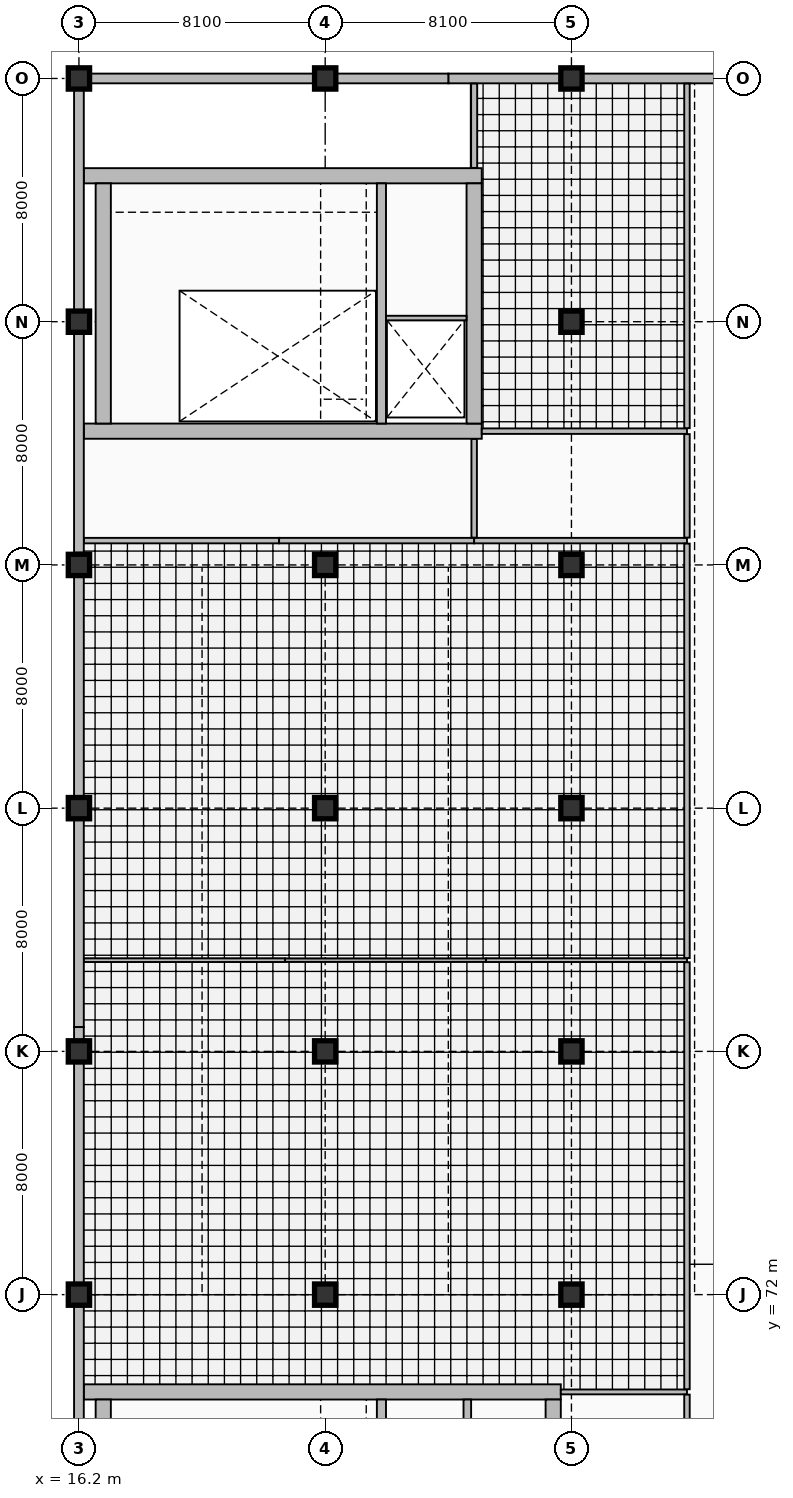
"""IFC4 building model, lengths in metres.
Left out: names, types, materials, properties, quantities, classifications, styles, units other than length and angle.
Written with IfcOpenShell. Run it as: python <this file> out.ifc"""

import sys

from ifc_helpers import new_model, si_unit, direction, frame, frame_2d, origin, origin_2d, place, context, subcontext, project, spatial, rectangle, extrude, element, fill, save


model = new_model("IFC4")
c1 = context("Model", 3, precision=1e-05, world=origin(), true_north=direction((0.0, 1.0)))
c2 = subcontext(c1, "Body", "Model", "MODEL_VIEW")
j1 = project(units=[si_unit("LENGTHUNIT", "METRE"), si_unit("PLANEANGLEUNIT", "RADIAN")], contexts=[c1])
p1 = place(None, origin())
s1 = spatial("IfcSite", under=j1, at=p1, CompositionType="ELEMENT")
p2 = place(p1, origin())
s2 = spatial("IfcBuilding", under=s1, at=p2, CompositionType="ELEMENT")
p3 = place(p2, frame((0.0, 0.0, 10.2)))
s3 = spatial("IfcBuildingStorey", under=s2, at=p3, CompositionType="ELEMENT", Elevation=10.2)
p4 = place(p3, frame((16.36, 68.8, 0.0), z_axis=(0.0, 0.0, 1.0), x_axis=(1.0, 0.0, 0.0)))
e1 = element("IfcWall", 1, at=p4, inside=s3, PredefinedType="SHEAR", context=c2, shape_type="SweptSolid", body=[
    extrude(rectangle(XDim=15.69, YDim=0.5, at=frame_2d((7.845, 0.0))), origin(), (0.0, 0.0, 1.0), 4.5),
])
for number, where, z_axis, x_axis in (
    (2, (17.0, 60.65, 0.0), (0.0, 0.0, 1.0), (0.0, 1.0, 0.0)),
    (3, (31.8, 60.65, 0.0), (0.0, 0.0, 1.0), (0.0, 1.0, 0.0)),
):
    element("IfcWall", number, at=place(p3, frame(where, z_axis=z_axis, x_axis=x_axis)), inside=s3, PredefinedType="SHEAR", context=c2, shape_type="SweptSolid", body=[
        extrude(rectangle(XDim=7.9, YDim=0.5, at=frame_2d((3.95, 0.0))), origin(), (0.0, 0.0, 1.0), 4.5),
    ])
p5 = place(p3, frame((26.15, 60.65, 0.0), z_axis=(0.0, 0.0, 1.0), x_axis=(0.0, 1.0, 0.0)))
e4 = element("IfcWall", 4, at=p5, inside=s3, PredefinedType="SHEAR", context=c2, shape_type="SweptSolid", body=[
    extrude(rectangle(XDim=7.9, YDim=0.3, at=frame_2d((3.95, 0.0))), origin(), (0.0, 0.0, 1.0), 4.5),
])
p6 = place(p3, frame((28.975, 60.65, 0.0), z_axis=(0.0, 0.0, 1.0), x_axis=(0.0, 1.0, 0.0)))
e5 = element("IfcWall", 5, at=p6, inside=s3, PredefinedType="SHEAR", context=c2, shape_type="SweptSolid", body=[
    extrude(rectangle(XDim=7.9, YDim=0.25, at=frame_2d((3.95, 0.0))), origin(), (0.0, 0.0, 1.0), 4.5),
])
p7 = place(p3, frame((16.36, 100.4, 0.0), z_axis=(0.0, 0.0, 1.0), x_axis=(1.0, 0.0, 0.0)))
e6 = element("IfcWall", 6, at=p7, inside=s3, PredefinedType="SHEAR", context=c2, shape_type="SweptSolid", body=[
    extrude(rectangle(XDim=13.09, YDim=0.5, at=frame_2d((6.545, 0.0))), origin(), (0.0, 0.0, 1.0), 4.5),
])
p8 = place(p7, frame((1.39, 0.0, 0.0)))
e7 = element("IfcOpeningElement", 7, at=p8, cuts=e6, PredefinedType="OPENING", context=c2, shape_type="SweptSolid", body=[
    extrude(rectangle(XDim=1.15, YDim=2.25, at=frame_2d((0.575, 1.125))), frame((0.0, 0.26, 0.0), z_axis=(0.0, -1.0, 0.0), x_axis=(1.0, 0.0, 0.0)), (0.0, 0.0, 1.0), 0.52),
])
p9 = place(p7, frame((10.695, 0.0, 0.0)))
e8 = element("IfcOpeningElement", 8, at=p9, cuts=e6, PredefinedType="OPENING", context=c2, shape_type="SweptSolid", body=[
    extrude(rectangle(XDim=1.1, YDim=2.2, at=frame_2d((0.55, 1.1))), frame((0.0, 0.26, 0.0), z_axis=(0.0, -1.0, 0.0), x_axis=(1.0, 0.0, 0.0)), (0.0, 0.0, 1.0), 0.52),
])
p10 = place(p3, frame((16.36, 108.8, 0.0), z_axis=(0.0, 0.0, 1.0), x_axis=(1.0, 0.0, 0.0)))
e9 = element("IfcWall", 9, at=p10, inside=s3, PredefinedType="SHEAR", context=c2, shape_type="SweptSolid", body=[
    extrude(rectangle(XDim=13.09, YDim=0.5, at=frame_2d((6.545, 0.0))), origin(), (0.0, 0.0, 1.0), 4.5),
])
for number, where, z_axis, x_axis in (
    (10, (17.0, 100.65, 0.0), (0.0, 0.0, 1.0), (0.0, 1.0, 0.0)),
    (11, (29.2, 100.65, 0.0), (0.0, 0.0, 1.0), (0.0, 1.0, 0.0)),
):
    element("IfcWall", number, at=place(p3, frame(where, z_axis=z_axis, x_axis=x_axis)), inside=s3, PredefinedType="SHEAR", context=c2, shape_type="SweptSolid", body=[
        extrude(rectangle(XDim=7.9, YDim=0.5, at=frame_2d((3.95, 0.0))), origin(), (0.0, 0.0, 1.0), 4.5),
    ])
p11 = place(p3, frame((26.15, 100.65, 0.0), z_axis=(0.0, 0.0, 1.0), x_axis=(0.0, 1.0, 0.0)))
e12 = element("IfcWall", 12, at=p11, inside=s3, PredefinedType="SHEAR", context=c2, shape_type="SweptSolid", body=[
    extrude(rectangle(XDim=7.9, YDim=0.3, at=frame_2d((3.95, 0.0))), origin(), (0.0, 0.0, 1.0), 4.5),
])
for number, where, z_axis, x_axis in (
    (13, (16.2, 72.0, 0.0), (0.0, 0.0, 1.0), (1.0, 0.0, 0.0)),
    (14, (16.2, 80.0, 0.0), (0.0, 0.0, 1.0), (1.0, 0.0, 0.0)),
    (15, (16.2, 88.0, 0.0), (0.0, 0.0, 1.0), (1.0, 0.0, 0.0)),
    (16, (16.2, 96.0, 0.0), (0.0, 0.0, 1.0), (1.0, 0.0, 0.0)),
    (17, (16.2, 104.0, 0.0), (0.0, 0.0, 1.0), (1.0, 0.0, 0.0)),
    (18, (16.2, 112.0, 0.0), (0.0, 0.0, 1.0), (1.0, 0.0, 0.0)),
    (19, (24.3, 72.0, 0.0), (0.0, 0.0, 1.0), (1.0, 0.0, 0.0)),
    (20, (24.3, 80.0, 0.0), (0.0, 0.0, 1.0), (1.0, 0.0, 0.0)),
    (21, (24.3, 88.0, 0.0), (0.0, 0.0, 1.0), (1.0, 0.0, 0.0)),
    (22, (24.3, 96.0, 0.0), (0.0, 0.0, 1.0), (1.0, 0.0, 0.0)),
    (23, (24.3, 112.0, 0.0), (0.0, 0.0, 1.0), (1.0, 0.0, 0.0)),
    (24, (32.4, 72.0, 0.0), (0.0, 0.0, 1.0), (1.0, 0.0, 0.0)),
    (25, (32.4, 80.0, 0.0), (0.0, 0.0, 1.0), (1.0, 0.0, 0.0)),
    (26, (32.4, 88.0, 0.0), (0.0, 0.0, 1.0), (1.0, 0.0, 0.0)),
    (27, (32.4, 96.0, 0.0), (0.0, 0.0, 1.0), (1.0, 0.0, 0.0)),
    (28, (32.4, 104.0, 0.0), (0.0, 0.0, 1.0), (1.0, 0.0, 0.0)),
    (29, (32.4, 112.0, 0.0), (0.0, 0.0, 1.0), (1.0, 0.0, 0.0)),
):
    element("IfcColumn", number, at=place(p3, frame(where, z_axis=z_axis, x_axis=x_axis)), inside=s3, PredefinedType="COLUMN", context=c2, shape_type="SweptSolid", body=[
        extrude(rectangle(XDim=0.7, YDim=0.7, at=origin_2d()), origin(), (0.0, 0.0, 1.0), 4.5),
    ])
p12 = place(p3, frame((40.5, 112.0, 0.0), z_axis=(0.0, 0.0, 1.0), x_axis=(-1.0, 0.0, 0.0)))
e30 = element("IfcWall", 30, at=p12, inside=s3, PredefinedType="SOLIDWALL", context=c2, shape_type="SweptSolid", body=[
    extrude(rectangle(XDim=12.15, YDim=0.32, at=frame_2d((6.075, 0.0))), origin(), (0.0, 0.0, 1.0), 3.632),
])
p13 = place(p12, frame((5.4, 0.0, 0.85)))
e31 = element("IfcOpeningElement", 31, at=p13, cuts=e30, PredefinedType="OPENING", context=c2, shape_type="SweptSolid", body=[
    extrude(rectangle(XDim=1.35, YDim=2.1, at=frame_2d((0.675, 1.05))), frame((0.0, 0.17, 0.0), z_axis=(0.0, -1.0, 0.0), x_axis=(1.0, 0.0, 0.0)), (0.0, 0.0, 1.0), 0.34),
])
p14 = place(p3, frame((28.35, 112.0, 0.0), z_axis=(0.0, 0.0, 1.0), x_axis=(-1.0, 0.0, 0.0)))
e32 = element("IfcWall", 32, at=p14, inside=s3, PredefinedType="SOLIDWALL", context=c2, shape_type="SweptSolid", body=[
    extrude(rectangle(XDim=12.15, YDim=0.32, at=frame_2d((6.075, 0.0))), origin(), (0.0, 0.0, 1.0), 3.632),
])
p15 = place(p14, frame((5.4, 0.0, 0.95)))
e33 = element("IfcOpeningElement", 33, at=p15, cuts=e32, PredefinedType="OPENING", context=c2, shape_type="SweptSolid", body=[
    extrude(rectangle(XDim=1.5, YDim=1.8, at=frame_2d((0.75, 0.9))), frame((0.0, 0.17, 0.0), z_axis=(0.0, -1.0, 0.0), x_axis=(1.0, 0.0, 0.0)), (0.0, 0.0, 1.0), 0.34),
])
p16 = place(p3, frame((16.2, 112.0, 0.0), z_axis=(0.0, 0.0, 1.0), x_axis=(0.0, -1.0, 0.0)))
e34 = element("IfcWall", 34, at=p16, inside=s3, PredefinedType="SOLIDWALL", context=c2, shape_type="SweptSolid", body=[
    extrude(rectangle(XDim=15.6, YDim=0.32, at=frame_2d((7.8, 0.0))), origin(), (0.0, 0.0, 1.0), 3.732),
])
p17 = place(p3, frame((16.2, 96.4, 0.0), z_axis=(0.0, 0.0, 1.0), x_axis=(0.0, -1.0, 0.0)))
e35 = element("IfcWall", 35, at=p17, inside=s3, PredefinedType="SOLIDWALL", context=c2, shape_type="SweptSolid", body=[
    extrude(rectangle(XDim=15.6, YDim=0.32, at=frame_2d((7.8, 0.0))), origin(), (0.0, 0.0, 1.0), 3.732),
])
p18 = place(p17, frame((4.5, 0.0, 0.95)))
e36 = element("IfcOpeningElement", 36, at=p18, cuts=e35, PredefinedType="OPENING", context=c2, shape_type="SweptSolid", body=[
    extrude(rectangle(XDim=1.8, YDim=1.5, at=frame_2d((0.9, 0.75))), frame((0.0, 0.17, 0.0), z_axis=(0.0, -1.0, 0.0), x_axis=(1.0, 0.0, 0.0)), (0.0, 0.0, 1.0), 0.34),
])
p19 = place(p3, frame((16.2, 80.8, 0.0), z_axis=(0.0, 0.0, 1.0), x_axis=(0.0, -1.0, 0.0)))
e37 = element("IfcWall", 37, at=p19, inside=s3, PredefinedType="SOLIDWALL", context=c2, shape_type="SweptSolid", body=[
    extrude(rectangle(XDim=15.6, YDim=0.32, at=frame_2d((7.8, 0.0))), origin(), (0.0, 0.0, 1.0), 3.732),
])
p20 = place(p19, frame((4.5, 0.0, 0.95)))
e38 = element("IfcOpeningElement", 38, at=p20, cuts=e37, PredefinedType="OPENING", context=c2, shape_type="SweptSolid", body=[
    extrude(rectangle(XDim=1.8, YDim=1.8, at=frame_2d((0.9, 0.9))), frame((0.0, 0.17, 0.0), z_axis=(0.0, -1.0, 0.0), x_axis=(1.0, 0.0, 0.0)), (0.0, 0.0, 1.0), 0.34),
])
p21 = place(p3, frame((26.3, 104.12, 0.0), z_axis=(0.0, 0.0, 1.0), x_axis=(1.0, 0.0, 0.0)))
e39 = element("IfcWall", 39, at=p21, inside=s3, PredefinedType="PARTITIONING", context=c2, shape_type="SweptSolid", body=[
    extrude(rectangle(XDim=2.65, YDim=0.15, at=frame_2d((1.325, 0.0))), origin(), (0.0, 0.0, 1.0), 4.24),
])
p22 = place(p3, frame((16.368, 83.0, 0.0), z_axis=(0.0, 0.0, 1.0), x_axis=(1.0, 0.0, 0.0)))
e40 = element("IfcWall", 40, at=p22, inside=s3, PredefinedType="PARTITIONING", context=c2, shape_type="SweptSolid", body=[
    extrude(rectangle(XDim=6.611, YDim=0.12, at=frame_2d((3.305, 0.0))), origin(), (0.0, 0.0, 1.0), 4.24),
])
p23 = place(p3, frame((22.979, 83.0, 0.0), z_axis=(0.0, 0.0, 1.0), x_axis=(1.0, 0.0, 0.0)))
e41 = element("IfcWall", 41, at=p23, inside=s3, PredefinedType="PARTITIONING", context=c2, shape_type="SweptSolid", body=[
    extrude(rectangle(XDim=6.611, YDim=0.11, at=frame_2d((3.305, 0.0))), origin(), (0.0, 0.0, 1.0), 4.24),
])
p24 = place(p3, frame((29.589, 83.0, 0.0), z_axis=(0.0, 0.0, 1.0), x_axis=(1.0, 0.0, 0.0)))
e42 = element("IfcWall", 42, at=p24, inside=s3, PredefinedType="PARTITIONING", context=c2, shape_type="SweptSolid", body=[
    extrude(rectangle(XDim=6.611, YDim=0.12, at=frame_2d((3.305, 0.0))), origin(), (0.0, 0.0, 1.0), 4.24),
])
for number, where, z_axis, x_axis in (
    (43, (16.368, 96.8, 0.0), (0.0, 0.0, 1.0), (1.0, 0.0, 0.0)),
    (44, (22.784, 96.8, 0.0), (0.0, 0.0, 1.0), (1.0, 0.0, 0.0)),
):
    element("IfcWall", number, at=place(p3, frame(where, z_axis=z_axis, x_axis=x_axis)), inside=s3, PredefinedType="PARTITIONING", context=c2, shape_type="SweptSolid", body=[
        extrude(rectangle(XDim=6.416, YDim=0.18, at=frame_2d((3.208, 0.0))), origin(), (0.0, 0.0, 1.0), 4.24),
    ])
p25 = place(p3, frame((29.2, 96.8, 0.0), z_axis=(0.0, 0.0, 1.0), x_axis=(1.0, 0.0, 0.0)))
e45 = element("IfcWall", 45, at=p25, inside=s3, PredefinedType="PARTITIONING", context=c2, shape_type="SweptSolid", body=[
    extrude(rectangle(XDim=7.0, YDim=0.18, at=frame_2d((3.5, 0.0))), origin(), (0.0, 0.0, 1.0), 4.24),
])
p26 = place(p3, frame((29.45, 100.4, 0.0), z_axis=(0.0, 0.0, 1.0), x_axis=(1.0, 0.0, 0.0)))
e46 = element("IfcWall", 46, at=p26, inside=s3, PredefinedType="PARTITIONING", context=c2, shape_type="SweptSolid", body=[
    extrude(rectangle(XDim=6.75, YDim=0.18, at=frame_2d((3.375, 0.0))), origin(), (0.0, 0.0, 1.0), 4.24),
])
p27 = place(p3, frame((32.05, 68.8, 0.0), z_axis=(0.0, 0.0, 1.0), x_axis=(1.0, 0.0, 0.0)))
e47 = element("IfcWall", 47, at=p27, inside=s3, PredefinedType="PARTITIONING", context=c2, shape_type="SweptSolid", body=[
    extrude(rectangle(XDim=4.15, YDim=0.16, at=frame_2d((2.075, 0.0))), origin(), (0.0, 0.0, 1.0), 4.24),
])
p28 = place(p3, frame((29.2, 96.898, 0.0), z_axis=(0.0, 0.0, 1.0), x_axis=(0.0, 1.0, 0.0)))
e48 = element("IfcWall", 48, at=p28, inside=s3, PredefinedType="PARTITIONING", context=c2, shape_type="SweptSolid", body=[
    extrude(rectangle(XDim=3.244, YDim=0.18, at=frame_2d((1.622, 0.0))), origin(), (0.0, 0.0, 1.0), 4.24),
])
p29 = place(p28, frame((1.022, 0.0, 0.0)))
e49 = element("IfcOpeningElement", 49, at=p29, cuts=e48, PredefinedType="OPENING", context=c2, shape_type="SweptSolid", body=[
    extrude(rectangle(XDim=1.2, YDim=2.2, at=frame_2d((0.6, 1.1))), frame((0.0, 0.1, 0.0), z_axis=(0.0, -1.0, 0.0), x_axis=(1.0, 0.0, 0.0)), (0.0, 0.0, 1.0), 0.2),
])
p30 = place(p3, frame((29.2, 109.058, 0.0), z_axis=(0.0, 0.0, 1.0), x_axis=(0.0, 1.0, 0.0)))
e50 = element("IfcWall", 50, at=p30, inside=s3, PredefinedType="PARTITIONING", context=c2, shape_type="SweptSolid", body=[
    extrude(rectangle(XDim=2.774, YDim=0.2, at=frame_2d((1.387, 0.0))), origin(), (0.0, 0.0, 1.0), 4.24),
])
p31 = place(p3, frame((36.2, 66.088, 0.0), z_axis=(0.0, 0.0, 1.0), x_axis=(0.0, 1.0, 0.0)))
e51 = element("IfcWall", 51, at=p31, inside=s3, PredefinedType="PARTITIONING", context=c2, shape_type="SweptSolid", body=[
    extrude(rectangle(XDim=2.624, YDim=0.18, at=frame_2d((1.312, 0.0))), origin(), (0.0, 0.0, 1.0), 4.24),
])
p32 = place(p31, frame((0.812, 0.0, 0.0)))
e52 = element("IfcOpeningElement", 52, at=p32, cuts=e51, PredefinedType="OPENING", context=c2, shape_type="SweptSolid", body=[
    extrude(rectangle(XDim=1.0, YDim=2.15, at=frame_2d((0.5, 1.075))), frame((0.0, 0.1, 0.0), z_axis=(0.0, -1.0, 0.0), x_axis=(1.0, 0.0, 0.0)), (0.0, 0.0, 1.0), 0.2),
])
p33 = place(p3, frame((36.2, 68.888, 0.0), z_axis=(0.0, 0.0, 1.0), x_axis=(0.0, 1.0, 0.0)))
e53 = element("IfcWall", 53, at=p33, inside=s3, PredefinedType="PARTITIONING", context=c2, shape_type="SweptSolid", body=[
    extrude(rectangle(XDim=14.044, YDim=0.18, at=frame_2d((7.022, 0.0))), origin(), (0.0, 0.0, 1.0), 3.825),
])
p34 = place(p33, frame((6.522, 0.0, 0.0)))
e54 = element("IfcOpeningElement", 54, at=p34, cuts=e53, PredefinedType="OPENING", context=c2, shape_type="SweptSolid", body=[
    extrude(rectangle(XDim=1.0, YDim=2.2, at=frame_2d((0.5, 1.1))), frame((0.0, 0.1, 0.0), z_axis=(0.0, -1.0, 0.0), x_axis=(1.0, 0.0, 0.0)), (0.0, 0.0, 1.0), 0.2),
])
p35 = place(p3, frame((36.2, 83.068, 0.0), z_axis=(0.0, 0.0, 1.0), x_axis=(0.0, 1.0, 0.0)))
e55 = element("IfcWall", 55, at=p35, inside=s3, PredefinedType="PARTITIONING", context=c2, shape_type="SweptSolid", body=[
    extrude(rectangle(XDim=13.634, YDim=0.18, at=frame_2d((6.817, 0.0))), origin(), (0.0, 0.0, 1.0), 3.825),
])
p36 = place(p35, frame((6.317, 0.0, 0.0)))
e56 = element("IfcOpeningElement", 56, at=p36, cuts=e55, PredefinedType="OPENING", context=c2, shape_type="SweptSolid", body=[
    extrude(rectangle(XDim=1.0, YDim=2.2, at=frame_2d((0.5, 1.1))), frame((0.0, 0.1, 0.0), z_axis=(0.0, -1.0, 0.0), x_axis=(1.0, 0.0, 0.0)), (0.0, 0.0, 1.0), 0.2),
])
p37 = place(p3, frame((36.2, 96.898, 0.0), z_axis=(0.0, 0.0, 1.0), x_axis=(0.0, 1.0, 0.0)))
e57 = element("IfcWall", 57, at=p37, inside=s3, PredefinedType="PARTITIONING", context=c2, shape_type="SweptSolid", body=[
    extrude(rectangle(XDim=3.404, YDim=0.18, at=frame_2d((1.702, 0.0))), origin(), (0.0, 0.0, 1.0), 3.929),
])
p38 = place(p37, frame((1.152, 0.0, 0.0)))
e58 = element("IfcOpeningElement", 58, at=p38, cuts=e57, PredefinedType="OPENING", context=c2, shape_type="SweptSolid", body=[
    extrude(rectangle(XDim=1.1, YDim=2.2, at=frame_2d((0.55, 1.1))), frame((0.0, 0.1, 0.0), z_axis=(0.0, -1.0, 0.0), x_axis=(1.0, 0.0, 0.0)), (0.0, 0.0, 1.0), 0.2),
])
p39 = place(p3, frame((36.2, 100.498, 0.0), z_axis=(0.0, 0.0, 1.0), x_axis=(0.0, 1.0, 0.0)))
e59 = element("IfcWall", 59, at=p39, inside=s3, PredefinedType="PARTITIONING", context=c2, shape_type="SweptSolid", body=[
    extrude(rectangle(XDim=11.334, YDim=0.18, at=frame_2d((5.667, 0.0))), origin(), (0.0, 0.0, 1.0), 3.878),
])
p40 = place(p39, frame((5.167, 0.0, 0.0)))
e60 = element("IfcOpeningElement", 60, at=p40, cuts=e59, PredefinedType="OPENING", context=c2, shape_type="SweptSolid", body=[
    extrude(rectangle(XDim=1.0, YDim=2.2, at=frame_2d((0.5, 1.1))), frame((0.0, 0.1, 0.0), z_axis=(0.0, -1.0, 0.0), x_axis=(1.0, 0.0, 0.0)), (0.0, 0.0, 1.0), 0.2),
])
p41 = place(p13, origin())
e61 = element("IfcWindow", 61, at=p41, inside=s3, PartitioningType="DOUBLE_PANEL_VERTICAL", PredefinedType="WINDOW", context=c2, shape_type="SweptSolid", body=[
    extrude(rectangle(XDim=1.35, YDim=2.1, at=frame_2d((0.675, 1.05))), frame((0.0, 0.03, 0.0), z_axis=(0.0, -1.0, 0.0), x_axis=(1.0, 0.0, 0.0)), (0.0, 0.0, 1.0), 0.06),
])
fill(e31, e61)
p42 = place(p15, origin())
e62 = element("IfcWindow", 62, at=p42, inside=s3, PartitioningType="DOUBLE_PANEL_VERTICAL", PredefinedType="WINDOW", context=c2, shape_type="SweptSolid", body=[
    extrude(rectangle(XDim=1.5, YDim=1.8, at=frame_2d((0.75, 0.9))), frame((0.0, 0.03, 0.0), z_axis=(0.0, -1.0, 0.0), x_axis=(1.0, 0.0, 0.0)), (0.0, 0.0, 1.0), 0.06),
])
fill(e33, e62)
p43 = place(p18, origin())
e63 = element("IfcWindow", 63, at=p43, inside=s3, PartitioningType="DOUBLE_PANEL_VERTICAL", PredefinedType="WINDOW", context=c2, shape_type="SweptSolid", body=[
    extrude(rectangle(XDim=1.8, YDim=1.5, at=frame_2d((0.9, 0.75))), frame((0.0, 0.03, 0.0), z_axis=(0.0, -1.0, 0.0), x_axis=(1.0, 0.0, 0.0)), (0.0, 0.0, 1.0), 0.06),
])
fill(e36, e63)
p44 = place(p20, origin())
e64 = element("IfcWindow", 64, at=p44, inside=s3, PartitioningType="DOUBLE_PANEL_VERTICAL", PredefinedType="WINDOW", context=c2, shape_type="SweptSolid", body=[
    extrude(rectangle(XDim=1.8, YDim=1.8, at=frame_2d((0.9, 0.9))), frame((0.0, 0.03, 0.0), z_axis=(0.0, -1.0, 0.0), x_axis=(1.0, 0.0, 0.0)), (0.0, 0.0, 1.0), 0.06),
])
fill(e38, e64)
p45 = place(p8, origin())
e65 = element("IfcDoor", 65, at=p45, inside=s3, OperationType="SINGLE_SWING_RIGHT", PredefinedType="DOOR", context=c2, shape_type="SweptSolid", body=[
    extrude(rectangle(XDim=1.15, YDim=2.25, at=frame_2d((0.575, 1.125))), frame((0.0, 0.025, 0.0), z_axis=(0.0, -1.0, 0.0), x_axis=(1.0, 0.0, 0.0)), (0.0, 0.0, 1.0), 0.05),
])
fill(e7, e65)
p46 = place(p9, frame((1.1, 0.0, 0.0), z_axis=(0.0, 0.0, 1.0), x_axis=(-1.0, 0.0, 0.0)))
e66 = element("IfcDoor", 66, at=p46, inside=s3, OperationType="DOUBLE_DOOR_SLIDING", PredefinedType="DOOR", context=c2, shape_type="SweptSolid", body=[
    extrude(rectangle(XDim=1.1, YDim=2.2, at=frame_2d((0.55, 1.1))), frame((0.0, 0.025, 0.0), z_axis=(0.0, -1.0, 0.0), x_axis=(1.0, 0.0, 0.0)), (0.0, 0.0, 1.0), 0.05),
])
fill(e8, e66)
p47 = place(p29, frame((1.2, 0.0, 0.0), z_axis=(0.0, 0.0, 1.0), x_axis=(-1.0, 0.0, 0.0)))
e67 = element("IfcDoor", 67, at=p47, inside=s3, OperationType="SINGLE_SWING_LEFT", PredefinedType="DOOR", context=c2, shape_type="SweptSolid", body=[
    extrude(rectangle(XDim=1.2, YDim=2.2, at=frame_2d((0.6, 1.1))), frame((0.0, 0.025, 0.0), z_axis=(0.0, -1.0, 0.0), x_axis=(1.0, 0.0, 0.0)), (0.0, 0.0, 1.0), 0.05),
])
fill(e49, e67)
p48 = place(p34, origin())
e68 = element("IfcDoor", 68, at=p48, inside=s3, OperationType="SINGLE_SWING_LEFT", PredefinedType="DOOR", context=c2, shape_type="SweptSolid", body=[
    extrude(rectangle(XDim=1.0, YDim=2.2, at=frame_2d((0.5, 1.1))), frame((0.0, 0.025, 0.0), z_axis=(0.0, -1.0, 0.0), x_axis=(1.0, 0.0, 0.0)), (0.0, 0.0, 1.0), 0.05),
])
fill(e54, e68)
p49 = place(p36, origin())
e69 = element("IfcDoor", 69, at=p49, inside=s3, OperationType="SINGLE_SWING_RIGHT", PredefinedType="DOOR", context=c2, shape_type="SweptSolid", body=[
    extrude(rectangle(XDim=1.0, YDim=2.2, at=frame_2d((0.5, 1.1))), frame((0.0, 0.025, 0.0), z_axis=(0.0, -1.0, 0.0), x_axis=(1.0, 0.0, 0.0)), (0.0, 0.0, 1.0), 0.05),
])
fill(e56, e69)
p50 = place(p38, origin())
e70 = element("IfcDoor", 70, at=p50, inside=s3, OperationType="SINGLE_SWING_LEFT", PredefinedType="DOOR", context=c2, shape_type="SweptSolid", body=[
    extrude(rectangle(XDim=1.1, YDim=2.2, at=frame_2d((0.55, 1.1))), frame((0.0, 0.025, 0.0), z_axis=(0.0, -1.0, 0.0), x_axis=(1.0, 0.0, 0.0)), (0.0, 0.0, 1.0), 0.05),
])
fill(e58, e70)
p51 = place(p40, origin())
e71 = element("IfcDoor", 71, at=p51, inside=s3, OperationType="SINGLE_SWING_RIGHT", PredefinedType="DOOR", context=c2, shape_type="SweptSolid", body=[
    extrude(rectangle(XDim=1.0, YDim=2.2, at=frame_2d((0.5, 1.1))), frame((0.0, 0.025, 0.0), z_axis=(0.0, -1.0, 0.0), x_axis=(1.0, 0.0, 0.0)), (0.0, 0.0, 1.0), 0.05),
])
fill(e60, e71)
save(model, sys.argv[1])
